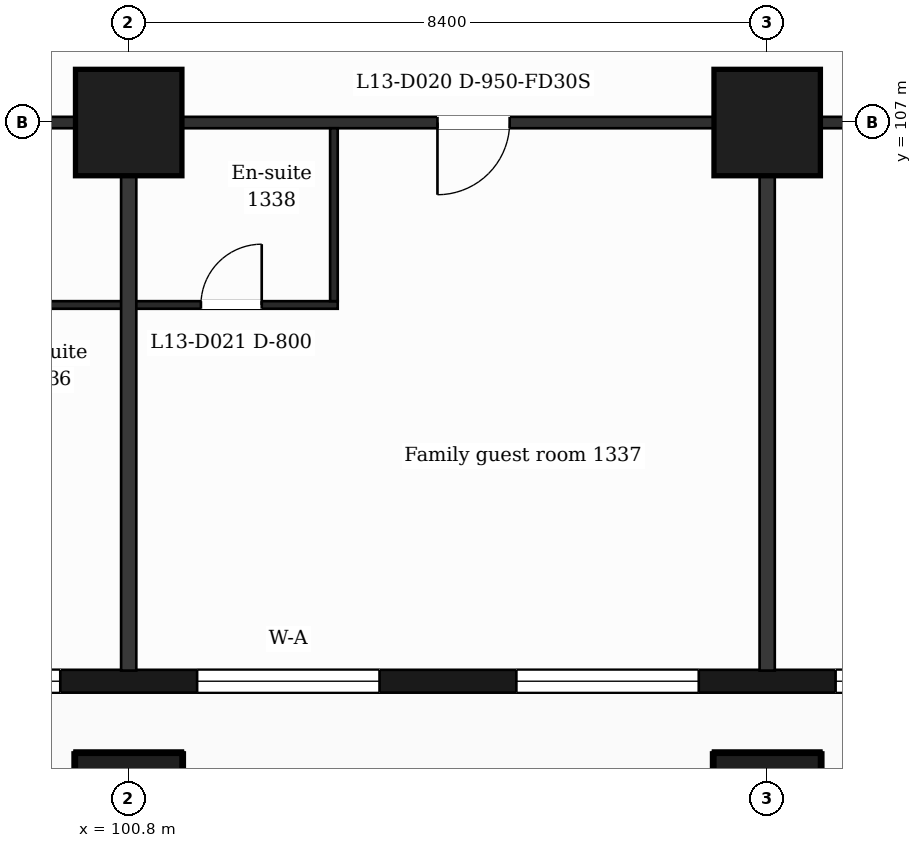
"""IFC4 building model, lengths in metres.
Left out: names, types, materials, properties, quantities, classifications, styles, units other than length and angle.
Written with IfcOpenShell. Run it as: python <this file> out.ifc"""

import sys

from ifc_helpers import new_model, si_unit, direction, frame, frame_2d, origin, origin_2d, place, context, subcontext, project, spatial, rectangle, extrude, element, fill, save


model = new_model("IFC4")
c1 = context("Model", 3, precision=1e-05, world=origin(), true_north=direction((0.0, 1.0)))
c2 = subcontext(c1, "Body", "Model", "MODEL_VIEW")
j1 = project(units=[si_unit("LENGTHUNIT", "METRE"), si_unit("PLANEANGLEUNIT", "RADIAN")], contexts=[c1])
p1 = place(None, origin())
s1 = spatial("IfcSite", under=j1, at=p1, CompositionType="ELEMENT")
p2 = place(p1, origin())
s2 = spatial("IfcBuilding", under=s1, at=p2, CompositionType="ELEMENT")
p3 = place(p2, frame((0.0, 0.0, 63.5)))
s3 = spatial("IfcBuildingStorey", under=s2, at=p3, CompositionType="ELEMENT", Elevation=63.5)
for number, where, z_axis, x_axis in (
    (1, (100.8, 98.0, 0.0), (0.0, 0.0, 1.0), (1.0, 0.0, 0.0)),
    (2, (109.2, 98.0, 0.0), (0.0, 0.0, 1.0), (1.0, 0.0, 0.0)),
    (3, (100.8, 107.0, 0.0), (0.0, 0.0, 1.0), (1.0, 0.0, 0.0)),
    (4, (109.2, 107.0, 0.0), (0.0, 0.0, 1.0), (1.0, 0.0, 0.0)),
):
    element("IfcColumn", number, at=place(p3, frame(where, z_axis=z_axis, x_axis=x_axis)), inside=s3, PredefinedType="COLUMN", context=c2, shape_type="SweptSolid", body=[
        extrude(rectangle(XDim=1.4, YDim=1.4, at=origin_2d()), origin(), (0.0, 0.0, 1.0), 3.5),
    ])
p4 = place(p3, frame((89.85, 99.65, 0.0), z_axis=(0.0, 0.0, 1.0), x_axis=(1.0, 0.0, 0.0)))
e5 = element("IfcWall", 5, at=p4, inside=s3, PredefinedType="SOLIDWALL", context=c2, shape_type="SweptSolid", body=[
    extrude(rectangle(XDim=47.25, YDim=0.3, at=frame_2d((23.625, 0.0))), origin(), (0.0, 0.0, 1.0), 3.18),
])
p5 = place(p4, frame((0.725, 0.0, 0.9)))
e6 = element("IfcOpeningElement", 6, at=p5, cuts=e5, PredefinedType="OPENING", context=c2, shape_type="SweptSolid", body=[
    extrude(rectangle(XDim=1.2, YDim=2.1, at=frame_2d((0.6, 1.05))), frame((0.0, 0.16, 0.0), z_axis=(0.0, -1.0, 0.0), x_axis=(1.0, 0.0, 0.0)), (0.0, 0.0, 1.0), 0.32),
])
p6 = place(p4, frame((3.45, 0.0, 0.9)))
e7 = element("IfcOpeningElement", 7, at=p6, cuts=e5, PredefinedType="OPENING", context=c2, shape_type="SweptSolid", body=[
    extrude(rectangle(XDim=2.4, YDim=2.1, at=frame_2d((1.2, 1.05))), frame((0.0, 0.16, 0.0), z_axis=(0.0, -1.0, 0.0), x_axis=(1.0, 0.0, 0.0)), (0.0, 0.0, 1.0), 0.32),
])
p7 = place(p4, frame((7.65, 0.0, 0.9)))
e8 = element("IfcOpeningElement", 8, at=p7, cuts=e5, PredefinedType="OPENING", context=c2, shape_type="SweptSolid", body=[
    extrude(rectangle(XDim=2.4, YDim=2.1, at=frame_2d((1.2, 1.05))), frame((0.0, 0.16, 0.0), z_axis=(0.0, -1.0, 0.0), x_axis=(1.0, 0.0, 0.0)), (0.0, 0.0, 1.0), 0.32),
])
p8 = place(p4, frame((11.85, 0.0, 0.9)))
e9 = element("IfcOpeningElement", 9, at=p8, cuts=e5, PredefinedType="OPENING", context=c2, shape_type="SweptSolid", body=[
    extrude(rectangle(XDim=2.4, YDim=2.1, at=frame_2d((1.2, 1.05))), frame((0.0, 0.16, 0.0), z_axis=(0.0, -1.0, 0.0), x_axis=(1.0, 0.0, 0.0)), (0.0, 0.0, 1.0), 0.32),
])
p9 = place(p4, frame((16.05, 0.0, 0.9)))
e10 = element("IfcOpeningElement", 10, at=p9, cuts=e5, PredefinedType="OPENING", context=c2, shape_type="SweptSolid", body=[
    extrude(rectangle(XDim=2.4, YDim=2.1, at=frame_2d((1.2, 1.05))), frame((0.0, 0.16, 0.0), z_axis=(0.0, -1.0, 0.0), x_axis=(1.0, 0.0, 0.0)), (0.0, 0.0, 1.0), 0.32),
])
p10 = place(p4, frame((20.25, 0.0, 0.9)))
e11 = element("IfcOpeningElement", 11, at=p10, cuts=e5, PredefinedType="OPENING", context=c2, shape_type="SweptSolid", body=[
    extrude(rectangle(XDim=2.4, YDim=2.1, at=frame_2d((1.2, 1.05))), frame((0.0, 0.16, 0.0), z_axis=(0.0, -1.0, 0.0), x_axis=(1.0, 0.0, 0.0)), (0.0, 0.0, 1.0), 0.32),
])
p11 = place(p4, frame((25.05, 0.0, 0.9)))
e12 = element("IfcOpeningElement", 12, at=p11, cuts=e5, PredefinedType="OPENING", context=c2, shape_type="SweptSolid", body=[
    extrude(rectangle(XDim=1.2, YDim=2.1, at=frame_2d((0.6, 1.05))), frame((0.0, 0.16, 0.0), z_axis=(0.0, -1.0, 0.0), x_axis=(1.0, 0.0, 0.0)), (0.0, 0.0, 1.0), 0.32),
])
p12 = place(p4, frame((29.25, 0.0, 0.9)))
e13 = element("IfcOpeningElement", 13, at=p12, cuts=e5, PredefinedType="OPENING", context=c2, shape_type="SweptSolid", body=[
    extrude(rectangle(XDim=1.2, YDim=2.1, at=frame_2d((0.6, 1.05))), frame((0.0, 0.16, 0.0), z_axis=(0.0, -1.0, 0.0), x_axis=(1.0, 0.0, 0.0)), (0.0, 0.0, 1.0), 0.32),
])
p13 = place(p4, frame((32.55, 0.0, 0.0)))
e14 = element("IfcOpeningElement", 14, at=p13, cuts=e5, PredefinedType="OPENING", context=c2, shape_type="SweptSolid", body=[
    extrude(rectangle(XDim=1.2, YDim=2.4, at=frame_2d((0.6, 1.2))), frame((0.0, 0.16, 0.0), z_axis=(0.0, -1.0, 0.0), x_axis=(1.0, 0.0, 0.0)), (0.0, 0.0, 1.0), 0.32),
])
p14 = place(p4, frame((34.35, 0.0, 0.9)))
e15 = element("IfcOpeningElement", 15, at=p14, cuts=e5, PredefinedType="OPENING", context=c2, shape_type="SweptSolid", body=[
    extrude(rectangle(XDim=1.2, YDim=2.1, at=frame_2d((0.6, 1.05))), frame((0.0, 0.16, 0.0), z_axis=(0.0, -1.0, 0.0), x_axis=(1.0, 0.0, 0.0)), (0.0, 0.0, 1.0), 0.32),
])
p15 = place(p4, frame((37.05, 0.0, 0.9)))
e16 = element("IfcOpeningElement", 16, at=p15, cuts=e5, PredefinedType="OPENING", context=c2, shape_type="SweptSolid", body=[
    extrude(rectangle(XDim=2.4, YDim=2.1, at=frame_2d((1.2, 1.05))), frame((0.0, 0.16, 0.0), z_axis=(0.0, -1.0, 0.0), x_axis=(1.0, 0.0, 0.0)), (0.0, 0.0, 1.0), 0.32),
])
p16 = place(p4, frame((40.95, 0.0, 0.0)))
e17 = element("IfcOpeningElement", 17, at=p16, cuts=e5, PredefinedType="OPENING", context=c2, shape_type="SweptSolid", body=[
    extrude(rectangle(XDim=1.2, YDim=2.4, at=frame_2d((0.6, 1.2))), frame((0.0, 0.16, 0.0), z_axis=(0.0, -1.0, 0.0), x_axis=(1.0, 0.0, 0.0)), (0.0, 0.0, 1.0), 0.32),
])
p17 = place(p4, frame((42.75, 0.0, 0.9)))
e18 = element("IfcOpeningElement", 18, at=p17, cuts=e5, PredefinedType="OPENING", context=c2, shape_type="SweptSolid", body=[
    extrude(rectangle(XDim=1.2, YDim=2.1, at=frame_2d((0.6, 1.05))), frame((0.0, 0.16, 0.0), z_axis=(0.0, -1.0, 0.0), x_axis=(1.0, 0.0, 0.0)), (0.0, 0.0, 1.0), 0.32),
])
p18 = place(p4, frame((45.25, 0.0, 0.9)))
e19 = element("IfcOpeningElement", 19, at=p18, cuts=e5, PredefinedType="OPENING", context=c2, shape_type="SweptSolid", body=[
    extrude(rectangle(XDim=1.2, YDim=2.1, at=frame_2d((0.6, 1.05))), frame((0.0, 0.16, 0.0), z_axis=(0.0, -1.0, 0.0), x_axis=(1.0, 0.0, 0.0)), (0.0, 0.0, 1.0), 0.32),
])
p19 = place(p3, frame((98.65, 104.6, 0.0), z_axis=(0.0, 0.0, 1.0), x_axis=(1.0, 0.0, 0.0)))
e20 = element("IfcWall", 20, at=p19, inside=s3, PredefinedType="PARTITIONING", context=c2, shape_type="SweptSolid", body=[
    extrude(rectangle(XDim=4.9, YDim=0.1, at=frame_2d((2.45, 0.0))), origin(), (0.0, 0.0, 1.0), 3.18),
])
p20 = place(p19, frame((3.1, 0.0, 0.0)))
e21 = element("IfcOpeningElement", 21, at=p20, cuts=e20, PredefinedType="OPENING", context=c2, shape_type="SweptSolid", body=[
    extrude(rectangle(XDim=0.8, YDim=2.1, at=frame_2d((0.4, 1.05))), frame((0.0, 0.06, 0.0), z_axis=(0.0, -1.0, 0.0), x_axis=(1.0, 0.0, 0.0)), (0.0, 0.0, 1.0), 0.12),
])
p21 = place(p3, frame((87.018, 107.0, 0.0), z_axis=(0.0, 0.0, 1.0), x_axis=(1.0, 0.0, 0.0)))
e22 = element("IfcWall", 22, at=p21, inside=s3, PredefinedType="PARTITIONING", context=c2, shape_type="SweptSolid", body=[
    extrude(rectangle(XDim=52.765, YDim=0.15, at=frame_2d((26.382, 0.0))), origin(), (0.0, 0.0, 1.0), 3.18),
])
p22 = place(p21, frame((1.032, 0.0, 0.0)))
e23 = element("IfcOpeningElement", 23, at=p22, cuts=e22, PredefinedType="OPENING", context=c2, shape_type="SweptSolid", body=[
    extrude(rectangle(XDim=0.95, YDim=2.1, at=frame_2d((0.475, 1.05))), frame((0.0, 0.085, 0.0), z_axis=(0.0, -1.0, 0.0), x_axis=(1.0, 0.0, 0.0)), (0.0, 0.0, 1.0), 0.17),
])
p23 = place(p21, frame((6.894, 0.0, 0.0)))
e24 = element("IfcOpeningElement", 24, at=p23, cuts=e22, PredefinedType="OPENING", context=c2, shape_type="SweptSolid", body=[
    extrude(rectangle(XDim=0.95, YDim=2.1, at=frame_2d((0.475, 1.05))), frame((0.0, 0.085, 0.0), z_axis=(0.0, -1.0, 0.0), x_axis=(1.0, 0.0, 0.0)), (0.0, 0.0, 1.0), 0.17),
])
p24 = place(p21, frame((17.844, 0.0, 0.0)))
e25 = element("IfcOpeningElement", 25, at=p24, cuts=e22, PredefinedType="OPENING", context=c2, shape_type="SweptSolid", body=[
    extrude(rectangle(XDim=0.95, YDim=2.1, at=frame_2d((0.475, 1.05))), frame((0.0, 0.085, 0.0), z_axis=(0.0, -1.0, 0.0), x_axis=(1.0, 0.0, 0.0)), (0.0, 0.0, 1.0), 0.17),
])
p25 = place(p21, frame((26.245, 0.0, 0.0)))
e26 = element("IfcOpeningElement", 26, at=p25, cuts=e22, PredefinedType="OPENING", context=c2, shape_type="SweptSolid", body=[
    extrude(rectangle(XDim=0.95, YDim=2.1, at=frame_2d((0.475, 1.05))), frame((0.0, 0.085, 0.0), z_axis=(0.0, -1.0, 0.0), x_axis=(1.0, 0.0, 0.0)), (0.0, 0.0, 1.0), 0.17),
])
p26 = place(p21, frame((35.822, 0.0, 0.0)))
e27 = element("IfcOpeningElement", 27, at=p26, cuts=e22, PredefinedType="OPENING", context=c2, shape_type="SweptSolid", body=[
    extrude(rectangle(XDim=0.95, YDim=2.1, at=frame_2d((0.475, 1.05))), frame((0.0, 0.085, 0.0), z_axis=(0.0, -1.0, 0.0), x_axis=(1.0, 0.0, 0.0)), (0.0, 0.0, 1.0), 0.17),
])
p27 = place(p21, frame((42.302, 0.0, 0.0)))
e28 = element("IfcOpeningElement", 28, at=p27, cuts=e22, PredefinedType="OPENING", context=c2, shape_type="SweptSolid", body=[
    extrude(rectangle(XDim=0.95, YDim=2.1, at=frame_2d((0.475, 1.05))), frame((0.0, 0.085, 0.0), z_axis=(0.0, -1.0, 0.0), x_axis=(1.0, 0.0, 0.0)), (0.0, 0.0, 1.0), 0.17),
])
p28 = place(p21, frame((49.285, 0.0, 0.0)))
e29 = element("IfcOpeningElement", 29, at=p28, cuts=e22, PredefinedType="OPENING", context=c2, shape_type="SweptSolid", body=[
    extrude(rectangle(XDim=0.95, YDim=2.1, at=frame_2d((0.475, 1.05))), frame((0.0, 0.085, 0.0), z_axis=(0.0, -1.0, 0.0), x_axis=(1.0, 0.0, 0.0)), (0.0, 0.0, 1.0), 0.17),
])
p29 = place(p3, frame((100.8, 99.79, 0.0), z_axis=(0.0, 0.0, 1.0), x_axis=(0.0, 1.0, 0.0)))
e30 = element("IfcWall", 30, at=p29, inside=s3, PredefinedType="PARTITIONING", context=c2, shape_type="SweptSolid", body=[
    extrude(rectangle(XDim=7.135, YDim=0.2, at=frame_2d((3.567, 0.0))), origin(), (0.0, 0.0, 1.0), 3.18),
])
p30 = place(p3, frame((103.5, 104.65, 0.0), z_axis=(0.0, 0.0, 1.0), x_axis=(0.0, 1.0, 0.0)))
e31 = element("IfcWall", 31, at=p30, inside=s3, PredefinedType="PARTITIONING", context=c2, shape_type="SweptSolid", body=[
    extrude(rectangle(XDim=2.275, YDim=0.1, at=frame_2d((1.138, 0.0))), origin(), (0.0, 0.0, 1.0), 3.18),
])
p31 = place(p3, frame((109.2, 99.79, 0.0), z_axis=(0.0, 0.0, 1.0), x_axis=(0.0, 1.0, 0.0)))
e32 = element("IfcWall", 32, at=p31, inside=s3, PredefinedType="PARTITIONING", context=c2, shape_type="SweptSolid", body=[
    extrude(rectangle(XDim=7.135, YDim=0.2, at=frame_2d((3.567, 0.0))), origin(), (0.0, 0.0, 1.0), 3.18),
])
p32 = place(p7, origin())
e33 = element("IfcWindow", 33, at=p32, inside=s3, PartitioningType="SINGLE_PANEL", PredefinedType="WINDOW", context=c2, shape_type="SweptSolid", body=[
    extrude(rectangle(XDim=2.4, YDim=2.1, at=frame_2d((1.2, 1.05))), frame((0.0, 0.03, 0.0), z_axis=(0.0, -1.0, 0.0), x_axis=(1.0, 0.0, 0.0)), (0.0, 0.0, 1.0), 0.06),
])
fill(e8, e33)
p33 = place(p8, origin())
e34 = element("IfcWindow", 34, at=p33, inside=s3, PartitioningType="SINGLE_PANEL", PredefinedType="WINDOW", context=c2, shape_type="SweptSolid", body=[
    extrude(rectangle(XDim=2.4, YDim=2.1, at=frame_2d((1.2, 1.05))), frame((0.0, 0.03, 0.0), z_axis=(0.0, -1.0, 0.0), x_axis=(1.0, 0.0, 0.0)), (0.0, 0.0, 1.0), 0.06),
])
fill(e9, e34)
p34 = place(p9, origin())
e35 = element("IfcWindow", 35, at=p34, inside=s3, PartitioningType="SINGLE_PANEL", PredefinedType="WINDOW", context=c2, shape_type="SweptSolid", body=[
    extrude(rectangle(XDim=2.4, YDim=2.1, at=frame_2d((1.2, 1.05))), frame((0.0, 0.03, 0.0), z_axis=(0.0, -1.0, 0.0), x_axis=(1.0, 0.0, 0.0)), (0.0, 0.0, 1.0), 0.06),
])
fill(e10, e35)
p35 = place(p10, origin())
e36 = element("IfcWindow", 36, at=p35, inside=s3, PartitioningType="SINGLE_PANEL", PredefinedType="WINDOW", context=c2, shape_type="SweptSolid", body=[
    extrude(rectangle(XDim=2.4, YDim=2.1, at=frame_2d((1.2, 1.05))), frame((0.0, 0.03, 0.0), z_axis=(0.0, -1.0, 0.0), x_axis=(1.0, 0.0, 0.0)), (0.0, 0.0, 1.0), 0.06),
])
fill(e11, e36)
p36 = place(p24, origin())
e37 = element("IfcDoor", 37, at=p36, inside=s3, OperationType="SINGLE_SWING_LEFT", PredefinedType="DOOR", context=c2, shape_type="SweptSolid", body=[
    extrude(rectangle(XDim=0.95, YDim=2.1, at=frame_2d((0.475, 1.05))), frame((0.0, 0.025, 0.0), z_axis=(0.0, -1.0, 0.0), x_axis=(1.0, 0.0, 0.0)), (0.0, 0.0, 1.0), 0.05),
])
fill(e25, e37)
p37 = place(p20, origin())
e38 = element("IfcDoor", 38, at=p37, inside=s3, OperationType="SINGLE_SWING_RIGHT", PredefinedType="DOOR", context=c2, shape_type="SweptSolid", body=[
    extrude(rectangle(XDim=0.8, YDim=2.1, at=frame_2d((0.4, 1.05))), frame((0.0, 0.025, 0.0), z_axis=(0.0, -1.0, 0.0), x_axis=(1.0, 0.0, 0.0)), (0.0, 0.0, 1.0), 0.05),
])
fill(e21, e38)
save(model, sys.argv[1])
